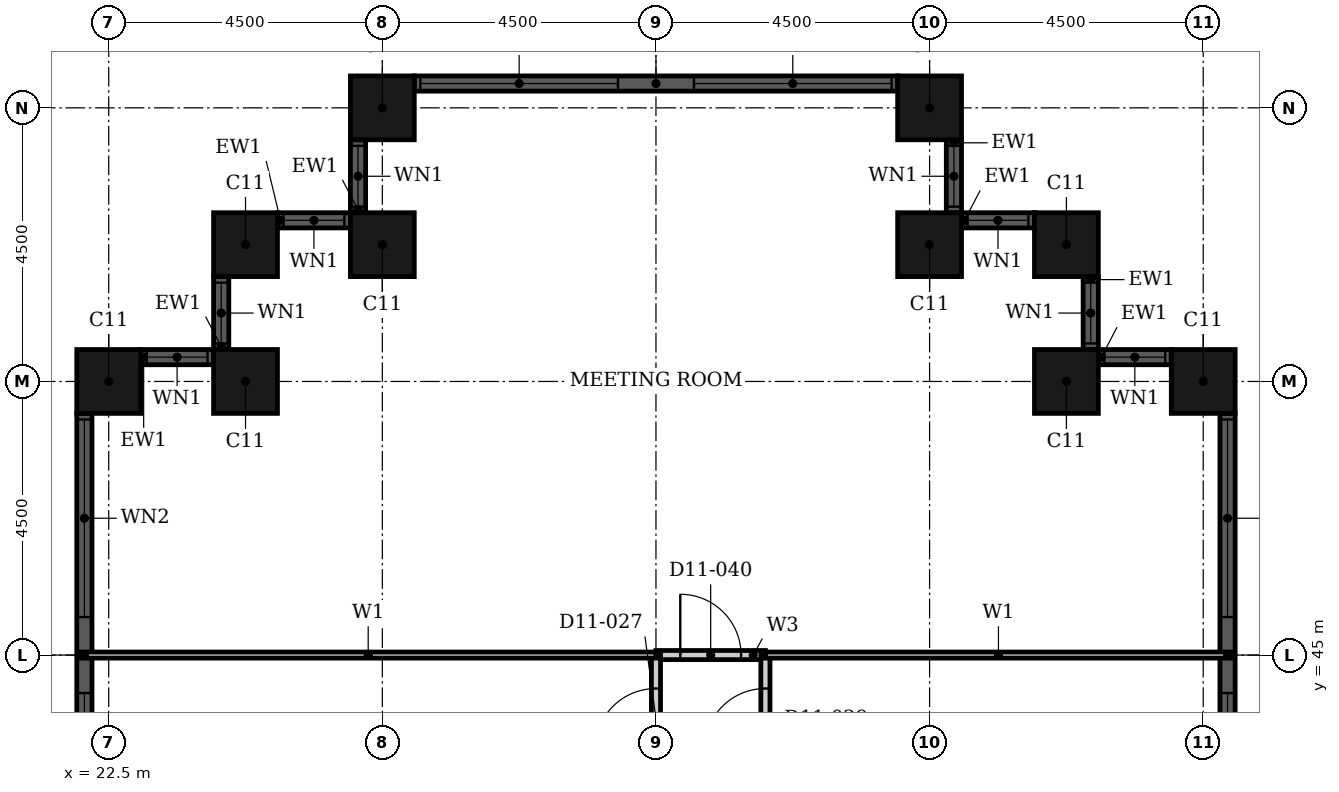
"""IFC4 building model, lengths in metres.
Left out: names, types, materials, properties, quantities, classifications, styles, units other than length and angle.
Written with IfcOpenShell. Run it as: python <this file> out.ifc"""

import sys

from ifc_helpers import new_model, si_unit, direction, frame, frame_2d, origin, origin_2d, place, context, subcontext, project, spatial, rectangle, hollow_rectangle, extrude, element, fill, save


model = new_model("IFC4")
c1 = context("Model", 3, precision=1e-05, world=origin(), true_north=direction((0.0, 1.0)))
c2 = subcontext(c1, "Body", "Model", "MODEL_VIEW")
j1 = project(units=[si_unit("LENGTHUNIT", "METRE"), si_unit("PLANEANGLEUNIT", "RADIAN")], contexts=[c1])
p1 = place(None, origin())
s1 = spatial("IfcSite", under=j1, at=p1, CompositionType="ELEMENT")
p2 = place(p1, origin())
s2 = spatial("IfcBuilding", under=s1, at=p2, CompositionType="ELEMENT")
p3 = place(p2, frame((0.0, 0.0, 52.8)))
s3 = spatial("IfcBuildingStorey", under=s2, at=p3, CompositionType="ELEMENT", Elevation=52.8)
for number, where, z_axis, x_axis in (
    (1, (40.5, 49.5, 0.0), (0.0, 0.0, 1.0), (1.0, 0.0, 0.0)),
    (2, (38.25, 49.5, 0.0), (0.0, 0.0, 1.0), (1.0, 0.0, 0.0)),
    (3, (38.25, 51.75, 0.0), (0.0, 0.0, 1.0), (1.0, 0.0, 0.0)),
    (4, (36.0, 51.75, 0.0), (0.0, 0.0, 1.0), (1.0, 0.0, 0.0)),
    (5, (36.0, 54.0, 0.0), (0.0, 0.0, 1.0), (1.0, 0.0, 0.0)),
    (6, (27.0, 54.0, 0.0), (0.0, 0.0, 1.0), (1.0, 0.0, 0.0)),
    (7, (27.0, 51.75, 0.0), (0.0, 0.0, 1.0), (1.0, 0.0, 0.0)),
    (8, (24.75, 51.75, 0.0), (0.0, 0.0, 1.0), (1.0, 0.0, 0.0)),
    (9, (24.75, 49.5, 0.0), (0.0, 0.0, 1.0), (1.0, 0.0, 0.0)),
    (10, (22.5, 49.5, 0.0), (0.0, 0.0, 1.0), (1.0, 0.0, 0.0)),
):
    element("IfcColumn", number, at=place(p3, frame(where, z_axis=z_axis, x_axis=x_axis)), inside=s3, PredefinedType="COLUMN", context=c2, shape_type="SweptSolid", body=[
        extrude(hollow_rectangle(XDim=1.05, YDim=1.05, WallThickness=0.034, at=origin_2d()), origin(), (0.0, 0.0, 1.0), 3.6),
    ])
p4 = place(p3, frame((40.9, 41.025, 0.0), z_axis=(0.0, 0.0, 1.0), x_axis=(0.0, 1.0, 0.0)))
e11 = element("IfcWall", 11, at=p4, inside=s3, PredefinedType="SOLIDWALL", context=c2, shape_type="SweptSolid", body=[
    extrude(rectangle(XDim=7.95, YDim=0.25, at=frame_2d((3.975, 0.0))), origin(), (0.0, 0.0, 1.0), 3.6),
])
p5 = place(p4, frame((0.1, 0.0, 0.9)))
e12 = element("IfcOpeningElement", 12, at=p5, cuts=e11, PredefinedType="OPENING", context=c2, shape_type="SweptSolid", body=[
    extrude(rectangle(XDim=3.25, YDim=2.08, at=frame_2d((1.625, 1.04))), frame((0.0, 0.135, 0.0), z_axis=(0.0, -1.0, 0.0), x_axis=(1.0, 0.0, 0.0)), (0.0, 0.0, 1.0), 0.27),
])
p6 = place(p4, frame((4.6, 0.0, 0.9)))
e13 = element("IfcOpeningElement", 13, at=p6, cuts=e11, PredefinedType="OPENING", context=c2, shape_type="SweptSolid", body=[
    extrude(rectangle(XDim=3.25, YDim=2.08, at=frame_2d((1.625, 1.04))), frame((0.0, 0.135, 0.0), z_axis=(0.0, -1.0, 0.0), x_axis=(1.0, 0.0, 0.0)), (0.0, 0.0, 1.0), 0.27),
])
p7 = place(p3, frame((39.975, 49.9, 0.0), z_axis=(0.0, 0.0, 1.0), x_axis=(-1.0, 0.0, 0.0)))
e14 = element("IfcWall", 14, at=p7, inside=s3, PredefinedType="SOLIDWALL", context=c2, shape_type="SweptSolid", body=[
    extrude(rectangle(XDim=1.2, YDim=0.25, at=frame_2d((0.6, 0.0))), origin(), (0.0, 0.0, 1.0), 3.6),
])
p8 = place(p7, frame((0.1, 0.0, 0.9)))
e15 = element("IfcOpeningElement", 15, at=p8, cuts=e14, PredefinedType="OPENING", context=c2, shape_type="SweptSolid", body=[
    extrude(rectangle(XDim=1.0, YDim=2.08, at=frame_2d((0.5, 1.04))), frame((0.0, 0.135, 0.0), z_axis=(0.0, -1.0, 0.0), x_axis=(1.0, 0.0, 0.0)), (0.0, 0.0, 1.0), 0.27),
])
p9 = place(p3, frame((38.65, 50.025, 0.0), z_axis=(0.0, 0.0, 1.0), x_axis=(0.0, 1.0, 0.0)))
e16 = element("IfcWall", 16, at=p9, inside=s3, PredefinedType="SOLIDWALL", context=c2, shape_type="SweptSolid", body=[
    extrude(rectangle(XDim=1.2, YDim=0.25, at=frame_2d((0.6, 0.0))), origin(), (0.0, 0.0, 1.0), 3.6),
])
p10 = place(p9, frame((0.1, 0.0, 0.9)))
e17 = element("IfcOpeningElement", 17, at=p10, cuts=e16, PredefinedType="OPENING", context=c2, shape_type="SweptSolid", body=[
    extrude(rectangle(XDim=1.0, YDim=2.08, at=frame_2d((0.5, 1.04))), frame((0.0, 0.135, 0.0), z_axis=(0.0, -1.0, 0.0), x_axis=(1.0, 0.0, 0.0)), (0.0, 0.0, 1.0), 0.27),
])
p11 = place(p3, frame((37.725, 52.15, 0.0), z_axis=(0.0, 0.0, 1.0), x_axis=(-1.0, 0.0, 0.0)))
e18 = element("IfcWall", 18, at=p11, inside=s3, PredefinedType="SOLIDWALL", context=c2, shape_type="SweptSolid", body=[
    extrude(rectangle(XDim=1.2, YDim=0.25, at=frame_2d((0.6, 0.0))), origin(), (0.0, 0.0, 1.0), 3.6),
])
p12 = place(p11, frame((0.1, 0.0, 0.9)))
e19 = element("IfcOpeningElement", 19, at=p12, cuts=e18, PredefinedType="OPENING", context=c2, shape_type="SweptSolid", body=[
    extrude(rectangle(XDim=1.0, YDim=2.08, at=frame_2d((0.5, 1.04))), frame((0.0, 0.135, 0.0), z_axis=(0.0, -1.0, 0.0), x_axis=(1.0, 0.0, 0.0)), (0.0, 0.0, 1.0), 0.27),
])
p13 = place(p3, frame((36.4, 52.275, 0.0), z_axis=(0.0, 0.0, 1.0), x_axis=(0.0, 1.0, 0.0)))
e20 = element("IfcWall", 20, at=p13, inside=s3, PredefinedType="SOLIDWALL", context=c2, shape_type="SweptSolid", body=[
    extrude(rectangle(XDim=1.2, YDim=0.25, at=frame_2d((0.6, 0.0))), origin(), (0.0, 0.0, 1.0), 3.6),
])
p14 = place(p13, frame((0.1, 0.0, 0.9)))
e21 = element("IfcOpeningElement", 21, at=p14, cuts=e20, PredefinedType="OPENING", context=c2, shape_type="SweptSolid", body=[
    extrude(rectangle(XDim=1.0, YDim=2.08, at=frame_2d((0.5, 1.04))), frame((0.0, 0.135, 0.0), z_axis=(0.0, -1.0, 0.0), x_axis=(1.0, 0.0, 0.0)), (0.0, 0.0, 1.0), 0.27),
])
p15 = place(p3, frame((35.475, 54.4, 0.0), z_axis=(0.0, 0.0, 1.0), x_axis=(-1.0, 0.0, 0.0)))
e22 = element("IfcWall", 22, at=p15, inside=s3, PredefinedType="SOLIDWALL", context=c2, shape_type="SweptSolid", body=[
    extrude(rectangle(XDim=7.95, YDim=0.25, at=frame_2d((3.975, 0.0))), origin(), (0.0, 0.0, 1.0), 3.6),
])
p16 = place(p15, frame((0.1, 0.0, 0.9)))
e23 = element("IfcOpeningElement", 23, at=p16, cuts=e22, PredefinedType="OPENING", context=c2, shape_type="SweptSolid", body=[
    extrude(rectangle(XDim=3.25, YDim=2.08, at=frame_2d((1.625, 1.04))), frame((0.0, 0.135, 0.0), z_axis=(0.0, -1.0, 0.0), x_axis=(1.0, 0.0, 0.0)), (0.0, 0.0, 1.0), 0.27),
])
p17 = place(p15, frame((4.6, 0.0, 0.9)))
e24 = element("IfcOpeningElement", 24, at=p17, cuts=e22, PredefinedType="OPENING", context=c2, shape_type="SweptSolid", body=[
    extrude(rectangle(XDim=3.25, YDim=2.08, at=frame_2d((1.625, 1.04))), frame((0.0, 0.135, 0.0), z_axis=(0.0, -1.0, 0.0), x_axis=(1.0, 0.0, 0.0)), (0.0, 0.0, 1.0), 0.27),
])
p18 = place(p3, frame((26.6, 53.475, 0.0), z_axis=(0.0, 0.0, 1.0), x_axis=(0.0, -1.0, 0.0)))
e25 = element("IfcWall", 25, at=p18, inside=s3, PredefinedType="SOLIDWALL", context=c2, shape_type="SweptSolid", body=[
    extrude(rectangle(XDim=1.2, YDim=0.25, at=frame_2d((0.6, 0.0))), origin(), (0.0, 0.0, 1.0), 3.6),
])
p19 = place(p18, frame((0.1, 0.0, 0.9)))
e26 = element("IfcOpeningElement", 26, at=p19, cuts=e25, PredefinedType="OPENING", context=c2, shape_type="SweptSolid", body=[
    extrude(rectangle(XDim=1.0, YDim=2.08, at=frame_2d((0.5, 1.04))), frame((0.0, 0.135, 0.0), z_axis=(0.0, -1.0, 0.0), x_axis=(1.0, 0.0, 0.0)), (0.0, 0.0, 1.0), 0.27),
])
p20 = place(p3, frame((26.475, 52.15, 0.0), z_axis=(0.0, 0.0, 1.0), x_axis=(-1.0, 0.0, 0.0)))
e27 = element("IfcWall", 27, at=p20, inside=s3, PredefinedType="SOLIDWALL", context=c2, shape_type="SweptSolid", body=[
    extrude(rectangle(XDim=1.2, YDim=0.25, at=frame_2d((0.6, 0.0))), origin(), (0.0, 0.0, 1.0), 3.6),
])
p21 = place(p20, frame((0.1, 0.0, 0.9)))
e28 = element("IfcOpeningElement", 28, at=p21, cuts=e27, PredefinedType="OPENING", context=c2, shape_type="SweptSolid", body=[
    extrude(rectangle(XDim=1.0, YDim=2.08, at=frame_2d((0.5, 1.04))), frame((0.0, 0.135, 0.0), z_axis=(0.0, -1.0, 0.0), x_axis=(1.0, 0.0, 0.0)), (0.0, 0.0, 1.0), 0.27),
])
p22 = place(p3, frame((24.35, 51.225, 0.0), z_axis=(0.0, 0.0, 1.0), x_axis=(0.0, -1.0, 0.0)))
e29 = element("IfcWall", 29, at=p22, inside=s3, PredefinedType="SOLIDWALL", context=c2, shape_type="SweptSolid", body=[
    extrude(rectangle(XDim=1.2, YDim=0.25, at=frame_2d((0.6, 0.0))), origin(), (0.0, 0.0, 1.0), 3.6),
])
p23 = place(p22, frame((0.1, 0.0, 0.9)))
e30 = element("IfcOpeningElement", 30, at=p23, cuts=e29, PredefinedType="OPENING", context=c2, shape_type="SweptSolid", body=[
    extrude(rectangle(XDim=1.0, YDim=2.08, at=frame_2d((0.5, 1.04))), frame((0.0, 0.135, 0.0), z_axis=(0.0, -1.0, 0.0), x_axis=(1.0, 0.0, 0.0)), (0.0, 0.0, 1.0), 0.27),
])
p24 = place(p3, frame((24.225, 49.9, 0.0), z_axis=(0.0, 0.0, 1.0), x_axis=(-1.0, 0.0, 0.0)))
e31 = element("IfcWall", 31, at=p24, inside=s3, PredefinedType="SOLIDWALL", context=c2, shape_type="SweptSolid", body=[
    extrude(rectangle(XDim=1.2, YDim=0.25, at=frame_2d((0.6, 0.0))), origin(), (0.0, 0.0, 1.0), 3.6),
])
p25 = place(p24, frame((0.1, 0.0, 0.9)))
e32 = element("IfcOpeningElement", 32, at=p25, cuts=e31, PredefinedType="OPENING", context=c2, shape_type="SweptSolid", body=[
    extrude(rectangle(XDim=1.0, YDim=2.08, at=frame_2d((0.5, 1.04))), frame((0.0, 0.135, 0.0), z_axis=(0.0, -1.0, 0.0), x_axis=(1.0, 0.0, 0.0)), (0.0, 0.0, 1.0), 0.27),
])
p26 = place(p3, frame((22.1, 48.975, 0.0), z_axis=(0.0, 0.0, 1.0), x_axis=(0.0, -1.0, 0.0)))
e33 = element("IfcWall", 33, at=p26, inside=s3, PredefinedType="SOLIDWALL", context=c2, shape_type="SweptSolid", body=[
    extrude(rectangle(XDim=7.95, YDim=0.25, at=frame_2d((3.975, 0.0))), origin(), (0.0, 0.0, 1.0), 3.6),
])
p27 = place(p26, frame((0.1, 0.0, 0.9)))
e34 = element("IfcOpeningElement", 34, at=p27, cuts=e33, PredefinedType="OPENING", context=c2, shape_type="SweptSolid", body=[
    extrude(rectangle(XDim=3.25, YDim=2.08, at=frame_2d((1.625, 1.04))), frame((0.0, 0.135, 0.0), z_axis=(0.0, -1.0, 0.0), x_axis=(1.0, 0.0, 0.0)), (0.0, 0.0, 1.0), 0.27),
])
p28 = place(p26, frame((4.6, 0.0, 0.9)))
e35 = element("IfcOpeningElement", 35, at=p28, cuts=e33, PredefinedType="OPENING", context=c2, shape_type="SweptSolid", body=[
    extrude(rectangle(XDim=3.25, YDim=2.08, at=frame_2d((1.625, 1.04))), frame((0.0, 0.135, 0.0), z_axis=(0.0, -1.0, 0.0), x_axis=(1.0, 0.0, 0.0)), (0.0, 0.0, 1.0), 0.27),
])
p29 = place(p3, frame((31.5, 45.0, 0.0), z_axis=(0.0, 0.0, 1.0), x_axis=(1.0, 0.0, 0.0)))
e36 = element("IfcWall", 36, at=p29, inside=s3, PredefinedType="PARTITIONING", context=c2, shape_type="SweptSolid", body=[
    extrude(rectangle(XDim=1.8, YDim=0.15, at=frame_2d((0.9, 0.0))), origin(), (0.0, 0.0, 1.0), 3.3),
])
p30 = place(p29, frame((0.4, 0.0, 0.0)))
e37 = element("IfcOpeningElement", 37, at=p30, cuts=e36, PredefinedType="OPENING", context=c2, shape_type="SweptSolid", body=[
    extrude(rectangle(XDim=1.0, YDim=2.1, at=frame_2d((0.5, 1.05))), frame((0.0, 0.085, 0.0), z_axis=(0.0, -1.0, 0.0), x_axis=(1.0, 0.0, 0.0)), (0.0, 0.0, 1.0), 0.17),
])
p31 = place(p3, frame((31.5, 33.3, 0.0), z_axis=(0.0, 0.0, 1.0), x_axis=(0.0, 1.0, 0.0)))
e38 = element("IfcWall", 38, at=p31, inside=s3, PredefinedType="PARTITIONING", context=c2, shape_type="SweptSolid", body=[
    extrude(rectangle(XDim=11.7, YDim=0.15, at=frame_2d((5.85, 0.0))), origin(), (0.0, 0.0, 1.0), 2.58),
])
p32 = place(p31, frame((10.15, 0.0, 0.0)))
e39 = element("IfcOpeningElement", 39, at=p32, cuts=e38, PredefinedType="OPENING", context=c2, shape_type="SweptSolid", body=[
    extrude(rectangle(XDim=1.0, YDim=2.1, at=frame_2d((0.5, 1.05))), frame((0.0, 0.085, 0.0), z_axis=(0.0, -1.0, 0.0), x_axis=(1.0, 0.0, 0.0)), (0.0, 0.0, 1.0), 0.17),
])
p33 = place(p3, frame((33.3, 33.3, 0.0), z_axis=(0.0, 0.0, 1.0), x_axis=(0.0, 1.0, 0.0)))
e40 = element("IfcWall", 40, at=p33, inside=s3, PredefinedType="PARTITIONING", context=c2, shape_type="SweptSolid", body=[
    extrude(rectangle(XDim=11.7, YDim=0.15, at=frame_2d((5.85, 0.0))), origin(), (0.0, 0.0, 1.0), 3.3),
])
p34 = place(p33, frame((10.15, 0.0, 0.0)))
e41 = element("IfcOpeningElement", 41, at=p34, cuts=e40, PredefinedType="OPENING", context=c2, shape_type="SweptSolid", body=[
    extrude(rectangle(XDim=1.0, YDim=2.1, at=frame_2d((0.5, 1.05))), frame((0.0, 0.085, 0.0), z_axis=(0.0, -1.0, 0.0), x_axis=(1.0, 0.0, 0.0)), (0.0, 0.0, 1.0), 0.17),
])
p35 = place(p3, frame((33.3, 45.0, 0.0), z_axis=(0.0, 0.0, 1.0), x_axis=(1.0, 0.0, 0.0)))
e42 = element("IfcWall", 42, at=p35, inside=s3, PredefinedType="PARTITIONING", context=c2, shape_type="SweptSolid", body=[
    extrude(rectangle(XDim=7.665, YDim=0.1, at=frame_2d((3.833, 0.0))), origin(), (0.0, 0.0, 1.0), 3.3),
])
p36 = place(p3, frame((22.035, 45.0, 0.0), z_axis=(0.0, 0.0, 1.0), x_axis=(1.0, 0.0, 0.0)))
e43 = element("IfcWall", 43, at=p36, inside=s3, PredefinedType="PARTITIONING", context=c2, shape_type="SweptSolid", body=[
    extrude(rectangle(XDim=9.465, YDim=0.1, at=frame_2d((4.732, 0.0))), origin(), (0.0, 0.0, 1.0), 3.3),
])
p37 = place(p5, origin())
e44 = element("IfcWindow", 44, at=p37, inside=s3, PartitioningType="SINGLE_PANEL", PredefinedType="WINDOW", context=c2, shape_type="SweptSolid", body=[
    extrude(rectangle(XDim=3.25, YDim=2.08, at=frame_2d((1.625, 1.04))), frame((0.0, 0.03, 0.0), z_axis=(0.0, -1.0, 0.0), x_axis=(1.0, 0.0, 0.0)), (0.0, 0.0, 1.0), 0.06),
])
fill(e12, e44)
p38 = place(p6, origin())
e45 = element("IfcWindow", 45, at=p38, inside=s3, PartitioningType="SINGLE_PANEL", PredefinedType="WINDOW", context=c2, shape_type="SweptSolid", body=[
    extrude(rectangle(XDim=3.25, YDim=2.08, at=frame_2d((1.625, 1.04))), frame((0.0, 0.03, 0.0), z_axis=(0.0, -1.0, 0.0), x_axis=(1.0, 0.0, 0.0)), (0.0, 0.0, 1.0), 0.06),
])
fill(e13, e45)
p39 = place(p8, origin())
e46 = element("IfcWindow", 46, at=p39, inside=s3, PartitioningType="SINGLE_PANEL", PredefinedType="WINDOW", context=c2, shape_type="SweptSolid", body=[
    extrude(rectangle(XDim=1.0, YDim=2.08, at=frame_2d((0.5, 1.04))), frame((0.0, 0.03, 0.0), z_axis=(0.0, -1.0, 0.0), x_axis=(1.0, 0.0, 0.0)), (0.0, 0.0, 1.0), 0.06),
])
fill(e15, e46)
p40 = place(p10, origin())
e47 = element("IfcWindow", 47, at=p40, inside=s3, PartitioningType="SINGLE_PANEL", PredefinedType="WINDOW", context=c2, shape_type="SweptSolid", body=[
    extrude(rectangle(XDim=1.0, YDim=2.08, at=frame_2d((0.5, 1.04))), frame((0.0, 0.03, 0.0), z_axis=(0.0, -1.0, 0.0), x_axis=(1.0, 0.0, 0.0)), (0.0, 0.0, 1.0), 0.06),
])
fill(e17, e47)
p41 = place(p12, origin())
e48 = element("IfcWindow", 48, at=p41, inside=s3, PartitioningType="SINGLE_PANEL", PredefinedType="WINDOW", context=c2, shape_type="SweptSolid", body=[
    extrude(rectangle(XDim=1.0, YDim=2.08, at=frame_2d((0.5, 1.04))), frame((0.0, 0.03, 0.0), z_axis=(0.0, -1.0, 0.0), x_axis=(1.0, 0.0, 0.0)), (0.0, 0.0, 1.0), 0.06),
])
fill(e19, e48)
p42 = place(p14, origin())
e49 = element("IfcWindow", 49, at=p42, inside=s3, PartitioningType="SINGLE_PANEL", PredefinedType="WINDOW", context=c2, shape_type="SweptSolid", body=[
    extrude(rectangle(XDim=1.0, YDim=2.08, at=frame_2d((0.5, 1.04))), frame((0.0, 0.03, 0.0), z_axis=(0.0, -1.0, 0.0), x_axis=(1.0, 0.0, 0.0)), (0.0, 0.0, 1.0), 0.06),
])
fill(e21, e49)
p43 = place(p16, origin())
e50 = element("IfcWindow", 50, at=p43, inside=s3, PartitioningType="SINGLE_PANEL", PredefinedType="WINDOW", context=c2, shape_type="SweptSolid", body=[
    extrude(rectangle(XDim=3.25, YDim=2.08, at=frame_2d((1.625, 1.04))), frame((0.0, 0.03, 0.0), z_axis=(0.0, -1.0, 0.0), x_axis=(1.0, 0.0, 0.0)), (0.0, 0.0, 1.0), 0.06),
])
fill(e23, e50)
p44 = place(p17, origin())
e51 = element("IfcWindow", 51, at=p44, inside=s3, PartitioningType="SINGLE_PANEL", PredefinedType="WINDOW", context=c2, shape_type="SweptSolid", body=[
    extrude(rectangle(XDim=3.25, YDim=2.08, at=frame_2d((1.625, 1.04))), frame((0.0, 0.03, 0.0), z_axis=(0.0, -1.0, 0.0), x_axis=(1.0, 0.0, 0.0)), (0.0, 0.0, 1.0), 0.06),
])
fill(e24, e51)
p45 = place(p19, origin())
e52 = element("IfcWindow", 52, at=p45, inside=s3, PartitioningType="SINGLE_PANEL", PredefinedType="WINDOW", context=c2, shape_type="SweptSolid", body=[
    extrude(rectangle(XDim=1.0, YDim=2.08, at=frame_2d((0.5, 1.04))), frame((0.0, 0.03, 0.0), z_axis=(0.0, -1.0, 0.0), x_axis=(1.0, 0.0, 0.0)), (0.0, 0.0, 1.0), 0.06),
])
fill(e26, e52)
p46 = place(p21, origin())
e53 = element("IfcWindow", 53, at=p46, inside=s3, PartitioningType="SINGLE_PANEL", PredefinedType="WINDOW", context=c2, shape_type="SweptSolid", body=[
    extrude(rectangle(XDim=1.0, YDim=2.08, at=frame_2d((0.5, 1.04))), frame((0.0, 0.03, 0.0), z_axis=(0.0, -1.0, 0.0), x_axis=(1.0, 0.0, 0.0)), (0.0, 0.0, 1.0), 0.06),
])
fill(e28, e53)
p47 = place(p23, origin())
e54 = element("IfcWindow", 54, at=p47, inside=s3, PartitioningType="SINGLE_PANEL", PredefinedType="WINDOW", context=c2, shape_type="SweptSolid", body=[
    extrude(rectangle(XDim=1.0, YDim=2.08, at=frame_2d((0.5, 1.04))), frame((0.0, 0.03, 0.0), z_axis=(0.0, -1.0, 0.0), x_axis=(1.0, 0.0, 0.0)), (0.0, 0.0, 1.0), 0.06),
])
fill(e30, e54)
p48 = place(p25, origin())
e55 = element("IfcWindow", 55, at=p48, inside=s3, PartitioningType="SINGLE_PANEL", PredefinedType="WINDOW", context=c2, shape_type="SweptSolid", body=[
    extrude(rectangle(XDim=1.0, YDim=2.08, at=frame_2d((0.5, 1.04))), frame((0.0, 0.03, 0.0), z_axis=(0.0, -1.0, 0.0), x_axis=(1.0, 0.0, 0.0)), (0.0, 0.0, 1.0), 0.06),
])
fill(e32, e55)
p49 = place(p27, origin())
e56 = element("IfcWindow", 56, at=p49, inside=s3, PartitioningType="SINGLE_PANEL", PredefinedType="WINDOW", context=c2, shape_type="SweptSolid", body=[
    extrude(rectangle(XDim=3.25, YDim=2.08, at=frame_2d((1.625, 1.04))), frame((0.0, 0.03, 0.0), z_axis=(0.0, -1.0, 0.0), x_axis=(1.0, 0.0, 0.0)), (0.0, 0.0, 1.0), 0.06),
])
fill(e34, e56)
p50 = place(p28, origin())
e57 = element("IfcWindow", 57, at=p50, inside=s3, PartitioningType="SINGLE_PANEL", PredefinedType="WINDOW", context=c2, shape_type="SweptSolid", body=[
    extrude(rectangle(XDim=3.25, YDim=2.08, at=frame_2d((1.625, 1.04))), frame((0.0, 0.03, 0.0), z_axis=(0.0, -1.0, 0.0), x_axis=(1.0, 0.0, 0.0)), (0.0, 0.0, 1.0), 0.06),
])
fill(e35, e57)
p51 = place(p32, origin())
e58 = element("IfcDoor", 58, at=p51, inside=s3, OperationType="SINGLE_SWING_RIGHT", PredefinedType="DOOR", context=c2, shape_type="SweptSolid", body=[
    extrude(rectangle(XDim=1.0, YDim=2.1, at=frame_2d((0.5, 1.05))), frame((0.0, 0.025, 0.0), z_axis=(0.0, -1.0, 0.0), x_axis=(1.0, 0.0, 0.0)), (0.0, 0.0, 1.0), 0.05),
])
fill(e39, e58)
p52 = place(p34, origin())
e59 = element("IfcDoor", 59, at=p52, inside=s3, OperationType="SINGLE_SWING_RIGHT", PredefinedType="DOOR", context=c2, shape_type="SweptSolid", body=[
    extrude(rectangle(XDim=1.0, YDim=2.1, at=frame_2d((0.5, 1.05))), frame((0.0, 0.025, 0.0), z_axis=(0.0, -1.0, 0.0), x_axis=(1.0, 0.0, 0.0)), (0.0, 0.0, 1.0), 0.05),
])
fill(e41, e59)
p53 = place(p30, origin())
e60 = element("IfcDoor", 60, at=p53, inside=s3, OperationType="SINGLE_SWING_RIGHT", PredefinedType="DOOR", context=c2, shape_type="SweptSolid", body=[
    extrude(rectangle(XDim=1.0, YDim=2.1, at=frame_2d((0.5, 1.05))), frame((0.0, 0.025, 0.0), z_axis=(0.0, -1.0, 0.0), x_axis=(1.0, 0.0, 0.0)), (0.0, 0.0, 1.0), 0.05),
])
fill(e37, e60)
save(model, sys.argv[1])
